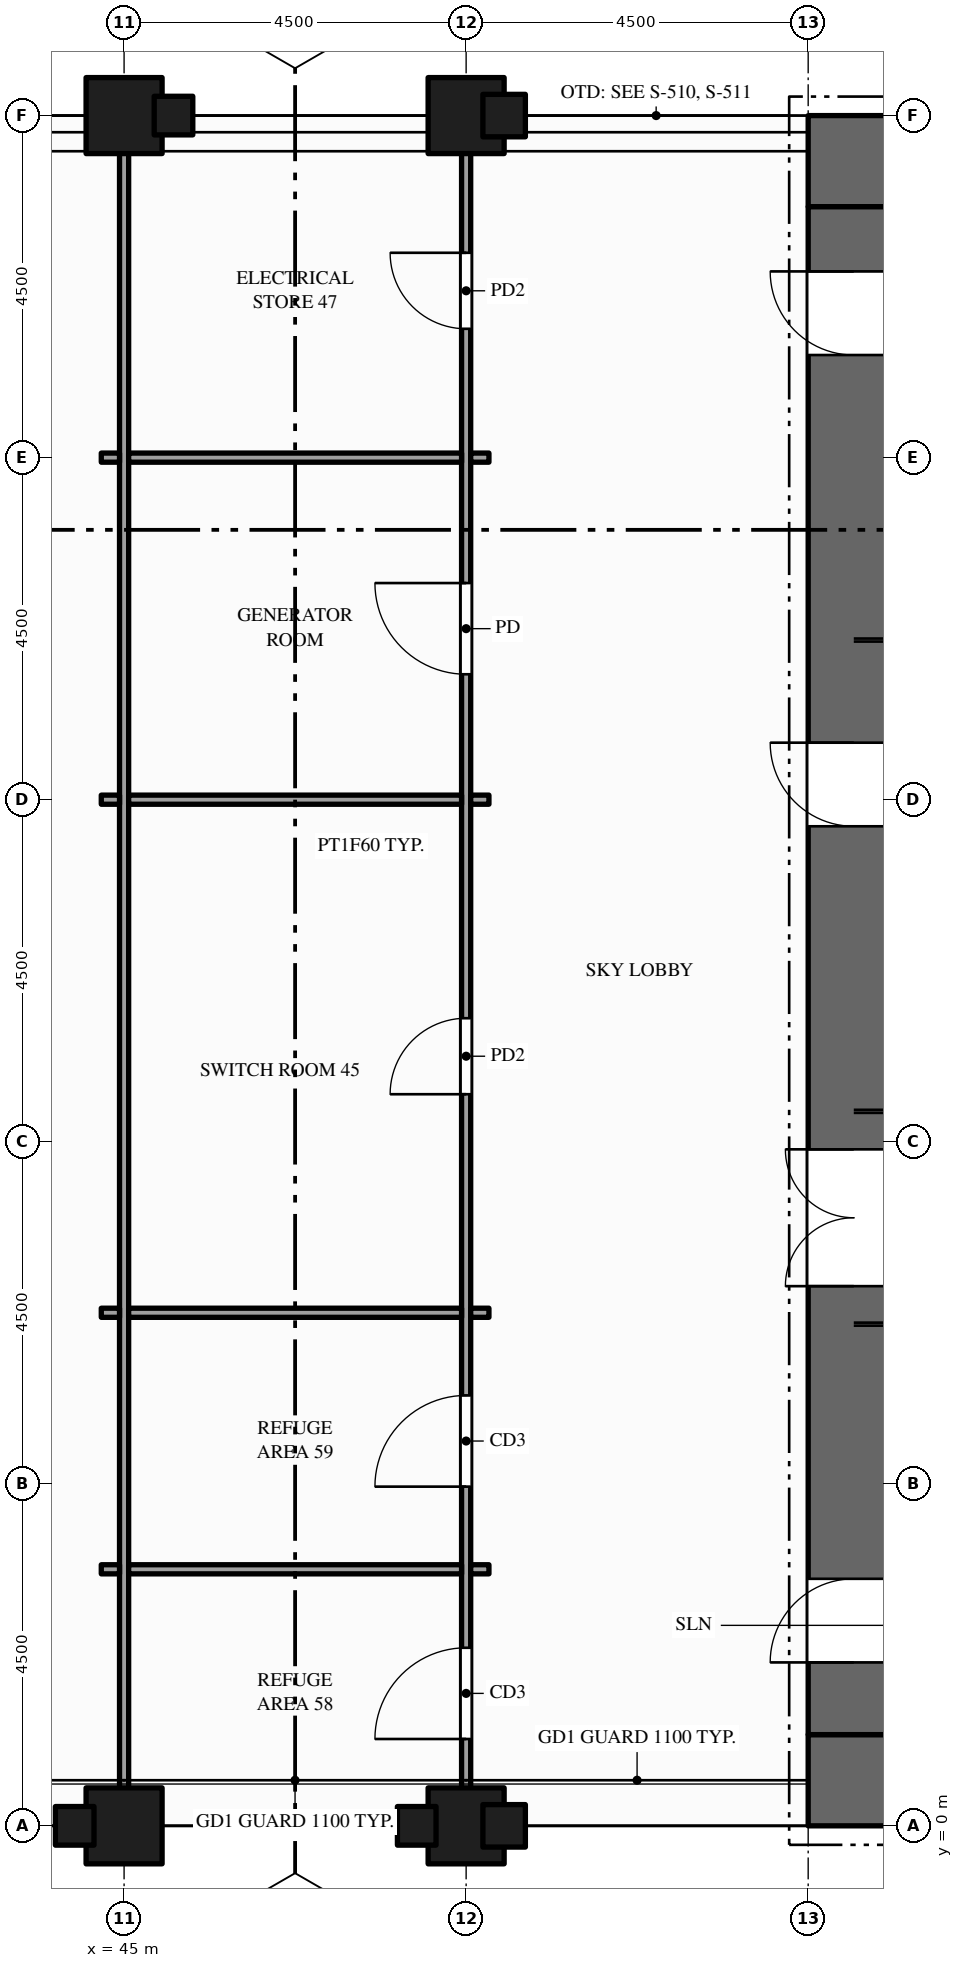
"""IFC4 building model, lengths in metres.
Left out: names, types, materials, properties, quantities, classifications, styles, units other than length and angle.
Written with IfcOpenShell. Run it as: python <this file> out.ifc"""

import sys

from ifc_helpers import new_model, si_unit, direction, frame, frame_2d, origin, origin_2d, place, context, subcontext, project, spatial, rectangle, hollow_rectangle, extrude, element, fill, save


model = new_model("IFC4")
c1 = context("Model", 3, precision=1e-05, world=origin(), true_north=direction((0.0, 1.0)))
c2 = subcontext(c1, "Body", "Model", "MODEL_VIEW")
j1 = project(units=[si_unit("LENGTHUNIT", "METRE"), si_unit("PLANEANGLEUNIT", "RADIAN")], contexts=[c1])
p1 = place(None, origin())
s1 = spatial("IfcSite", under=j1, at=p1, CompositionType="ELEMENT")
p2 = place(p1, origin())
s2 = spatial("IfcBuilding", under=s1, at=p2, CompositionType="ELEMENT")
p3 = place(p2, frame((0.0, 0.0, 131.0)))
s3 = spatial("IfcBuildingStorey", under=s2, at=p3, CompositionType="ELEMENT", Elevation=131.0)
for number, where, z_axis, x_axis in (
    (1, (67.5, 0.6, -0.15), (0.0, 0.0, 1.0), (-1.0, 0.0, 0.0)),
    (2, (54.0, 21.9, -0.15), (0.0, 0.0, 1.0), (1.0, 0.0, 0.0)),
):
    element("IfcWall", number, at=place(p3, frame(where, z_axis=z_axis, x_axis=x_axis)), inside=s3, PredefinedType="SHEAR", context=c2, shape_type="SweptSolid", body=[
        extrude(rectangle(XDim=13.5, YDim=1.2, at=frame_2d((6.75, 0.0))), origin(), (0.0, 0.0, 1.0), 8.0),
    ])
p4 = place(p3, frame((54.6, 1.2, -0.15), z_axis=(0.0, 0.0, 1.0), x_axis=(0.0, 1.0, 0.0)))
e3 = element("IfcWall", 3, at=p4, inside=s3, PredefinedType="SHEAR", context=c2, shape_type="SweptSolid", body=[
    extrude(rectangle(XDim=20.1, YDim=1.2, at=frame_2d((10.05, 0.0))), origin(), (0.0, 0.0, 1.0), 8.0),
])
p5 = place(p4, frame((5.9, 0.0, 0.15)))
e4 = element("IfcOpeningElement", 4, at=p5, cuts=e3, PredefinedType="OPENING", context=c2, shape_type="SweptSolid", body=[
    extrude(rectangle(XDim=1.8, YDim=2.1, at=frame_2d((0.9, 1.05))), frame((0.0, 0.61, 0.0), z_axis=(0.0, -1.0, 0.0), x_axis=(1.0, 0.0, 0.0)), (0.0, 0.0, 1.0), 1.22),
])
p6 = place(p4, frame((11.95, 0.0, 0.15)))
e5 = element("IfcOpeningElement", 5, at=p6, cuts=e3, PredefinedType="OPENING", context=c2, shape_type="SweptSolid", body=[
    extrude(rectangle(XDim=1.1, YDim=2.1, at=frame_2d((0.55, 1.05))), frame((0.0, 0.61, 0.0), z_axis=(0.0, -1.0, 0.0), x_axis=(1.0, 0.0, 0.0)), (0.0, 0.0, 1.0), 1.22),
])
p7 = place(p4, frame((0.95, 0.0, 0.15)))
e6 = element("IfcOpeningElement", 6, at=p7, cuts=e3, PredefinedType="OPENING", context=c2, shape_type="SweptSolid", body=[
    extrude(rectangle(XDim=1.1, YDim=2.1, at=frame_2d((0.55, 1.05))), frame((0.0, 0.61, 0.0), z_axis=(0.0, -1.0, 0.0), x_axis=(1.0, 0.0, 0.0)), (0.0, 0.0, 1.0), 1.22),
])
p8 = place(p4, frame((18.15, 0.0, 0.15)))
e7 = element("IfcOpeningElement", 7, at=p8, cuts=e3, PredefinedType="OPENING", context=c2, shape_type="SweptSolid", body=[
    extrude(rectangle(XDim=1.1, YDim=2.1, at=frame_2d((0.55, 1.05))), frame((0.0, 0.61, 0.0), z_axis=(0.0, -1.0, 0.0), x_axis=(1.0, 0.0, 0.0)), (0.0, 0.0, 1.0), 1.22),
])
for number, where, z_axis, x_axis in (
    (8, (45.0, 0.0, -0.25), (0.0, 0.0, 1.0), (1.0, 0.0, 0.0)),
    (9, (45.0, 22.5, -0.25), (0.0, 0.0, 1.0), (1.0, 0.0, 0.0)),
    (10, (49.5, 0.0, -0.25), (0.0, 0.0, 1.0), (1.0, 0.0, 0.0)),
    (11, (49.5, 22.5, -0.25), (0.0, 0.0, 1.0), (1.0, 0.0, 0.0)),
):
    element("IfcColumn", number, at=place(p3, frame(where, z_axis=z_axis, x_axis=x_axis)), inside=s3, PredefinedType="COLUMN", context=c2, shape_type="SweptSolid", body=[
        extrude(hollow_rectangle(XDim=1.0, YDim=1.0, WallThickness=0.05, at=origin_2d()), origin(), (0.0, 0.0, 1.0), 8.1),
    ])
p9 = place(p3, frame((45.0, 0.15, 0.0), z_axis=(0.0, 0.0, 1.0), x_axis=(0.0, 1.0, 0.0)))
e12 = element("IfcWall", 12, at=p9, inside=s3, PredefinedType="PARTITIONING", context=c2, shape_type="SweptSolid", body=[
    extrude(rectangle(XDim=22.2, YDim=0.12, at=frame_2d((11.1, 0.0))), origin(), (0.0, 0.0, 1.0), 6.45),
])
p10 = place(p3, frame((49.5, 0.15, 0.0), z_axis=(0.0, 0.0, 1.0), x_axis=(0.0, 1.0, 0.0)))
e13 = element("IfcWall", 13, at=p10, inside=s3, PredefinedType="PARTITIONING", context=c2, shape_type="SweptSolid", body=[
    extrude(rectangle(XDim=22.2, YDim=0.12, at=frame_2d((11.1, 0.0))), origin(), (0.0, 0.0, 1.0), 6.45),
])
p11 = place(p10, frame((0.993, 0.0, 0.0)))
e14 = element("IfcOpeningElement", 14, at=p11, cuts=e13, PredefinedType="OPENING", context=c2, shape_type="SweptSolid", body=[
    extrude(rectangle(XDim=1.2, YDim=2.1, at=frame_2d((0.6, 1.05))), frame((0.0, 0.07, 0.0), z_axis=(0.0, -1.0, 0.0), x_axis=(1.0, 0.0, 0.0)), (0.0, 0.0, 1.0), 0.14),
])
p12 = place(p10, frame((4.312, 0.0, 0.0)))
e15 = element("IfcOpeningElement", 15, at=p12, cuts=e13, PredefinedType="OPENING", context=c2, shape_type="SweptSolid", body=[
    extrude(rectangle(XDim=1.2, YDim=2.1, at=frame_2d((0.6, 1.05))), frame((0.0, 0.07, 0.0), z_axis=(0.0, -1.0, 0.0), x_axis=(1.0, 0.0, 0.0)), (0.0, 0.0, 1.0), 0.14),
])
p13 = place(p10, frame((9.475, 0.0, 0.0)))
e16 = element("IfcOpeningElement", 16, at=p13, cuts=e13, PredefinedType="OPENING", context=c2, shape_type="SweptSolid", body=[
    extrude(rectangle(XDim=1.0, YDim=2.1, at=frame_2d((0.5, 1.05))), frame((0.0, 0.07, 0.0), z_axis=(0.0, -1.0, 0.0), x_axis=(1.0, 0.0, 0.0)), (0.0, 0.0, 1.0), 0.14),
])
p14 = place(p10, frame((15.0, 0.0, 0.0)))
e17 = element("IfcOpeningElement", 17, at=p14, cuts=e13, PredefinedType="OPENING", context=c2, shape_type="SweptSolid", body=[
    extrude(rectangle(XDim=1.2, YDim=2.1, at=frame_2d((0.6, 1.05))), frame((0.0, 0.07, 0.0), z_axis=(0.0, -1.0, 0.0), x_axis=(1.0, 0.0, 0.0)), (0.0, 0.0, 1.0), 0.14),
])
p15 = place(p10, frame((19.545, 0.0, 0.0)))
e18 = element("IfcOpeningElement", 18, at=p15, cuts=e13, PredefinedType="OPENING", context=c2, shape_type="SweptSolid", body=[
    extrude(rectangle(XDim=1.0, YDim=2.1, at=frame_2d((0.5, 1.05))), frame((0.0, 0.07, 0.0), z_axis=(0.0, -1.0, 0.0), x_axis=(1.0, 0.0, 0.0)), (0.0, 0.0, 1.0), 0.14),
])
p16 = place(p3, frame((44.7, 3.375, 0.0), z_axis=(0.0, 0.0, 1.0), x_axis=(1.0, 0.0, 0.0)))
e19 = element("IfcWall", 19, at=p16, inside=s3, PredefinedType="PARTITIONING", context=c2, shape_type="SweptSolid", body=[
    extrude(rectangle(XDim=0.24, YDim=0.12, at=frame_2d((0.12, 0.0))), origin(), (0.0, 0.0, 1.0), 7.149),
])
p17 = place(p3, frame((45.06, 3.375, 0.0), z_axis=(0.0, 0.0, 1.0), x_axis=(1.0, 0.0, 0.0)))
e20 = element("IfcWall", 20, at=p17, inside=s3, PredefinedType="PARTITIONING", context=c2, shape_type="SweptSolid", body=[
    extrude(rectangle(XDim=4.38, YDim=0.12, at=frame_2d((2.19, 0.0))), origin(), (0.0, 0.0, 1.0), 6.87),
])
p18 = place(p3, frame((49.56, 3.375, 0.0), z_axis=(0.0, 0.0, 1.0), x_axis=(1.0, 0.0, 0.0)))
e21 = element("IfcWall", 21, at=p18, inside=s3, PredefinedType="PARTITIONING", context=c2, shape_type="SweptSolid", body=[
    extrude(rectangle(XDim=0.24, YDim=0.12, at=frame_2d((0.12, 0.0))), origin(), (0.0, 0.0, 1.0), 6.87),
])
p19 = place(p3, frame((44.7, 6.75, 0.0), z_axis=(0.0, 0.0, 1.0), x_axis=(1.0, 0.0, 0.0)))
e22 = element("IfcWall", 22, at=p19, inside=s3, PredefinedType="PARTITIONING", context=c2, shape_type="SweptSolid", body=[
    extrude(rectangle(XDim=0.24, YDim=0.12, at=frame_2d((0.12, 0.0))), origin(), (0.0, 0.0, 1.0), 7.149),
])
p20 = place(p3, frame((45.06, 6.75, 0.0), z_axis=(0.0, 0.0, 1.0), x_axis=(1.0, 0.0, 0.0)))
e23 = element("IfcWall", 23, at=p20, inside=s3, PredefinedType="PARTITIONING", context=c2, shape_type="SweptSolid", body=[
    extrude(rectangle(XDim=4.38, YDim=0.12, at=frame_2d((2.19, 0.0))), origin(), (0.0, 0.0, 1.0), 6.87),
])
p21 = place(p3, frame((49.56, 6.75, 0.0), z_axis=(0.0, 0.0, 1.0), x_axis=(1.0, 0.0, 0.0)))
e24 = element("IfcWall", 24, at=p21, inside=s3, PredefinedType="PARTITIONING", context=c2, shape_type="SweptSolid", body=[
    extrude(rectangle(XDim=0.24, YDim=0.12, at=frame_2d((0.12, 0.0))), origin(), (0.0, 0.0, 1.0), 6.87),
])
p22 = place(p3, frame((44.7, 13.5, 0.0), z_axis=(0.0, 0.0, 1.0), x_axis=(1.0, 0.0, 0.0)))
e25 = element("IfcWall", 25, at=p22, inside=s3, PredefinedType="PARTITIONING", context=c2, shape_type="SweptSolid", body=[
    extrude(rectangle(XDim=0.24, YDim=0.12, at=frame_2d((0.12, 0.0))), origin(), (0.0, 0.0, 1.0), 7.149),
])
p23 = place(p3, frame((45.06, 13.5, 0.0), z_axis=(0.0, 0.0, 1.0), x_axis=(1.0, 0.0, 0.0)))
e26 = element("IfcWall", 26, at=p23, inside=s3, PredefinedType="PARTITIONING", context=c2, shape_type="SweptSolid", body=[
    extrude(rectangle(XDim=4.38, YDim=0.12, at=frame_2d((2.19, 0.0))), origin(), (0.0, 0.0, 1.0), 6.87),
])
p24 = place(p3, frame((49.56, 13.5, 0.0), z_axis=(0.0, 0.0, 1.0), x_axis=(1.0, 0.0, 0.0)))
e27 = element("IfcWall", 27, at=p24, inside=s3, PredefinedType="PARTITIONING", context=c2, shape_type="SweptSolid", body=[
    extrude(rectangle(XDim=0.24, YDim=0.12, at=frame_2d((0.12, 0.0))), origin(), (0.0, 0.0, 1.0), 6.87),
])
p25 = place(p3, frame((44.7, 18.0, 0.0), z_axis=(0.0, 0.0, 1.0), x_axis=(1.0, 0.0, 0.0)))
e28 = element("IfcWall", 28, at=p25, inside=s3, PredefinedType="PARTITIONING", context=c2, shape_type="SweptSolid", body=[
    extrude(rectangle(XDim=0.24, YDim=0.12, at=frame_2d((0.12, 0.0))), origin(), (0.0, 0.0, 1.0), 7.149),
])
p26 = place(p3, frame((45.06, 18.0, 0.0), z_axis=(0.0, 0.0, 1.0), x_axis=(1.0, 0.0, 0.0)))
e29 = element("IfcWall", 29, at=p26, inside=s3, PredefinedType="PARTITIONING", context=c2, shape_type="SweptSolid", body=[
    extrude(rectangle(XDim=4.38, YDim=0.12, at=frame_2d((2.19, 0.0))), origin(), (0.0, 0.0, 1.0), 6.87),
])
p27 = place(p3, frame((49.56, 18.0, 0.0), z_axis=(0.0, 0.0, 1.0), x_axis=(1.0, 0.0, 0.0)))
e30 = element("IfcWall", 30, at=p27, inside=s3, PredefinedType="PARTITIONING", context=c2, shape_type="SweptSolid", body=[
    extrude(rectangle(XDim=0.24, YDim=0.12, at=frame_2d((0.12, 0.0))), origin(), (0.0, 0.0, 1.0), 6.87),
])
p28 = place(p5, origin())
e31 = element("IfcDoor", 31, at=p28, inside=s3, OperationType="DOUBLE_DOOR_SINGLE_SWING", PredefinedType="DOOR", context=c2, shape_type="SweptSolid", body=[
    extrude(rectangle(XDim=1.8, YDim=2.1, at=frame_2d((0.9, 1.05))), frame((0.0, 0.025, 0.0), z_axis=(0.0, -1.0, 0.0), x_axis=(1.0, 0.0, 0.0)), (0.0, 0.0, 1.0), 0.05),
])
fill(e4, e31)
p29 = place(p6, origin())
e32 = element("IfcDoor", 32, at=p29, inside=s3, OperationType="SINGLE_SWING_RIGHT", PredefinedType="DOOR", context=c2, shape_type="SweptSolid", body=[
    extrude(rectangle(XDim=1.1, YDim=2.1, at=frame_2d((0.55, 1.05))), frame((0.0, 0.025, 0.0), z_axis=(0.0, -1.0, 0.0), x_axis=(1.0, 0.0, 0.0)), (0.0, 0.0, 1.0), 0.05),
])
fill(e5, e32)
p30 = place(p7, origin())
e33 = element("IfcDoor", 33, at=p30, inside=s3, OperationType="SINGLE_SWING_LEFT", PredefinedType="DOOR", context=c2, shape_type="SweptSolid", body=[
    extrude(rectangle(XDim=1.1, YDim=2.1, at=frame_2d((0.55, 1.05))), frame((0.0, 0.025, 0.0), z_axis=(0.0, -1.0, 0.0), x_axis=(1.0, 0.0, 0.0)), (0.0, 0.0, 1.0), 0.05),
])
fill(e6, e33)
p31 = place(p8, origin())
e34 = element("IfcDoor", 34, at=p31, inside=s3, OperationType="SINGLE_SWING_RIGHT", PredefinedType="DOOR", context=c2, shape_type="SweptSolid", body=[
    extrude(rectangle(XDim=1.1, YDim=2.1, at=frame_2d((0.55, 1.05))), frame((0.0, 0.025, 0.0), z_axis=(0.0, -1.0, 0.0), x_axis=(1.0, 0.0, 0.0)), (0.0, 0.0, 1.0), 0.05),
])
fill(e7, e34)
p32 = place(p11, origin())
e35 = element("IfcDoor", 35, at=p32, inside=s3, OperationType="SINGLE_SWING_LEFT", PredefinedType="DOOR", context=c2, shape_type="SweptSolid", body=[
    extrude(rectangle(XDim=1.2, YDim=2.1, at=frame_2d((0.6, 1.05))), frame((0.0, 0.025, 0.0), z_axis=(0.0, -1.0, 0.0), x_axis=(1.0, 0.0, 0.0)), (0.0, 0.0, 1.0), 0.05),
])
fill(e14, e35)
p33 = place(p12, origin())
e36 = element("IfcDoor", 36, at=p33, inside=s3, OperationType="SINGLE_SWING_LEFT", PredefinedType="DOOR", context=c2, shape_type="SweptSolid", body=[
    extrude(rectangle(XDim=1.2, YDim=2.1, at=frame_2d((0.6, 1.05))), frame((0.0, 0.025, 0.0), z_axis=(0.0, -1.0, 0.0), x_axis=(1.0, 0.0, 0.0)), (0.0, 0.0, 1.0), 0.05),
])
fill(e15, e36)
p34 = place(p13, origin())
e37 = element("IfcDoor", 37, at=p34, inside=s3, OperationType="SINGLE_SWING_LEFT", PredefinedType="DOOR", context=c2, shape_type="SweptSolid", body=[
    extrude(rectangle(XDim=1.0, YDim=2.1, at=frame_2d((0.5, 1.05))), frame((0.0, 0.025, 0.0), z_axis=(0.0, -1.0, 0.0), x_axis=(1.0, 0.0, 0.0)), (0.0, 0.0, 1.0), 0.05),
])
fill(e16, e37)
p35 = place(p14, origin())
e38 = element("IfcDoor", 38, at=p35, inside=s3, OperationType="SINGLE_SWING_RIGHT", PredefinedType="DOOR", context=c2, shape_type="SweptSolid", body=[
    extrude(rectangle(XDim=1.2, YDim=2.1, at=frame_2d((0.6, 1.05))), frame((0.0, 0.025, 0.0), z_axis=(0.0, -1.0, 0.0), x_axis=(1.0, 0.0, 0.0)), (0.0, 0.0, 1.0), 0.05),
])
fill(e17, e38)
p36 = place(p15, origin())
e39 = element("IfcDoor", 39, at=p36, inside=s3, OperationType="SINGLE_SWING_RIGHT", PredefinedType="DOOR", context=c2, shape_type="SweptSolid", body=[
    extrude(rectangle(XDim=1.0, YDim=2.1, at=frame_2d((0.5, 1.05))), frame((0.0, 0.025, 0.0), z_axis=(0.0, -1.0, 0.0), x_axis=(1.0, 0.0, 0.0)), (0.0, 0.0, 1.0), 0.05),
])
fill(e18, e39)
save(model, sys.argv[1])
